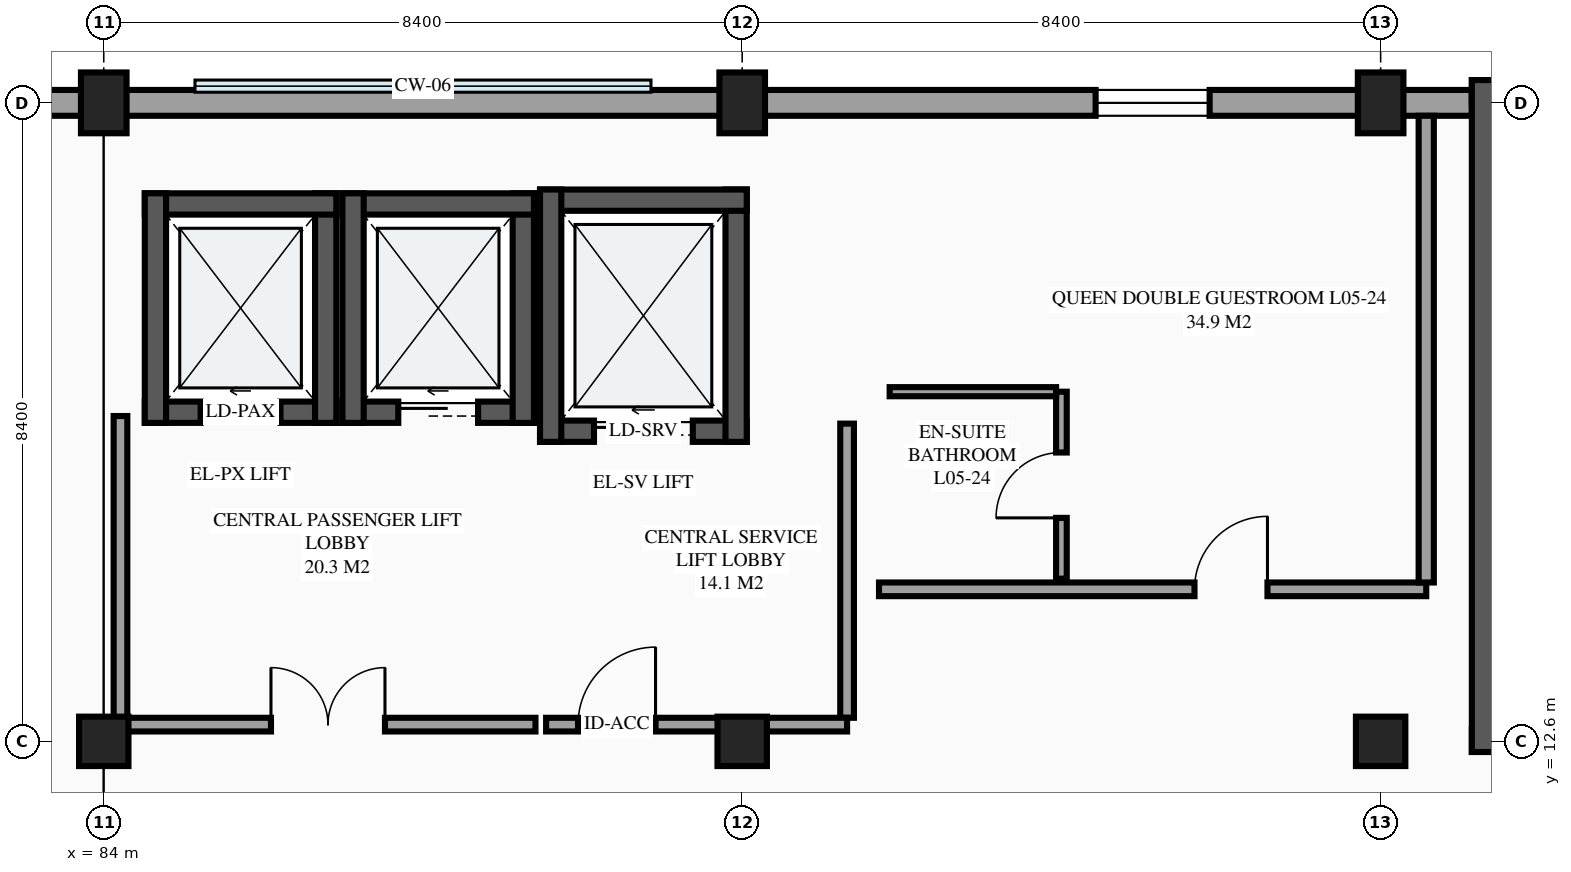
"""IFC4 building model, lengths in metres.
Left out: names, types, materials, properties, quantities, classifications, styles, units other than length and angle.
Written with IfcOpenShell. Run it as: python <this file> out.ifc"""

import sys

from ifc_helpers import new_model, si_unit, direction, frame, frame_2d, origin, origin_2d, place, context, subcontext, project, spatial, rectangle, extrude, element, fill, save


model = new_model("IFC4")
c1 = context("Model", 3, precision=1e-05, world=origin(), true_north=direction((0.0, 1.0)))
c2 = subcontext(c1, "Body", "Model", "MODEL_VIEW")
j1 = project(units=[si_unit("LENGTHUNIT", "METRE"), si_unit("PLANEANGLEUNIT", "RADIAN")], contexts=[c1])
p1 = place(None, origin())
s1 = spatial("IfcSite", under=j1, at=p1, CompositionType="ELEMENT")
p2 = place(p1, origin())
s2 = spatial("IfcBuilding", under=s1, at=p2, CompositionType="ELEMENT")
p3 = place(p2, frame((0.0, 0.0, 21.9)))
s3 = spatial("IfcBuildingStorey", under=s2, at=p3, CompositionType="ELEMENT", Elevation=21.9)
p4 = place(p3, frame((84.0, 12.6, 0.0), z_axis=(0.0, 0.0, 1.0), x_axis=(1.0, 0.0, 0.0)))
e1 = element("IfcColumn", 1, at=p4, inside=s3, PredefinedType="COLUMN", context=c2, shape_type="SweptSolid", body=[
    extrude(rectangle(XDim=0.65, YDim=0.65, at=origin_2d()), origin(), (0.0, 0.0, 1.0), 3.6),
])
p5 = place(p3, frame((84.0, 21.0, 0.0), z_axis=(0.0, 0.0, 1.0), x_axis=(1.0, 0.0, 0.0)))
e2 = element("IfcColumn", 2, at=p5, inside=s3, PredefinedType="COLUMN", context=c2, shape_type="SweptSolid", body=[
    extrude(rectangle(XDim=0.6, YDim=0.8, at=origin_2d()), origin(), (0.0, 0.0, 1.0), 3.6),
])
p6 = place(p3, frame((92.4, 12.6, 0.0), z_axis=(0.0, 0.0, 1.0), x_axis=(1.0, 0.0, 0.0)))
e3 = element("IfcColumn", 3, at=p6, inside=s3, PredefinedType="COLUMN", context=c2, shape_type="SweptSolid", body=[
    extrude(rectangle(XDim=0.65, YDim=0.65, at=origin_2d()), origin(), (0.0, 0.0, 1.0), 3.6),
])
p7 = place(p3, frame((92.4, 21.0, 0.0), z_axis=(0.0, 0.0, 1.0), x_axis=(1.0, 0.0, 0.0)))
e4 = element("IfcColumn", 4, at=p7, inside=s3, PredefinedType="COLUMN", context=c2, shape_type="SweptSolid", body=[
    extrude(rectangle(XDim=0.6, YDim=0.8, at=origin_2d()), origin(), (0.0, 0.0, 1.0), 3.6),
])
p8 = place(p3, frame((100.8, 12.6, 0.0), z_axis=(0.0, 0.0, 1.0), x_axis=(1.0, 0.0, 0.0)))
e5 = element("IfcColumn", 5, at=p8, inside=s3, PredefinedType="COLUMN", context=c2, shape_type="SweptSolid", body=[
    extrude(rectangle(XDim=0.65, YDim=0.65, at=origin_2d()), origin(), (0.0, 0.0, 1.0), 3.6),
])
p9 = place(p3, frame((100.8, 21.0, 0.0), z_axis=(0.0, 0.0, 1.0), x_axis=(1.0, 0.0, 0.0)))
e6 = element("IfcColumn", 6, at=p9, inside=s3, PredefinedType="COLUMN", context=c2, shape_type="SweptSolid", body=[
    extrude(rectangle(XDim=0.6, YDim=0.8, at=origin_2d()), origin(), (0.0, 0.0, 1.0), 3.6),
])
p10 = place(p3, frame((102.0, 21.0, 0.0), z_axis=(0.0, 0.0, 1.0), x_axis=(-1.0, 0.0, 0.0)))
e7 = element("IfcWall", 7, at=p10, inside=s3, PredefinedType="STANDARD", context=c2, shape_type="SweptSolid", body=[
    extrude(rectangle(XDim=9.6, YDim=0.34, at=frame_2d((4.8, 0.0))), origin(), (0.0, 0.0, 1.0), 2.48),
])
p11 = place(p10, frame((3.45, 0.0, 0.85)))
e8 = element("IfcOpeningElement", 8, at=p11, cuts=e7, PredefinedType="OPENING", context=c2, shape_type="SweptSolid", body=[
    extrude(rectangle(XDim=1.5, YDim=1.5, at=frame_2d((0.75, 0.75))), frame((0.0, 0.18, 0.0), z_axis=(0.0, -1.0, 0.0), x_axis=(1.0, 0.0, 0.0)), (0.0, 0.0, 1.0), 0.36),
])
p12 = place(p3, frame((84.54, 16.93, 0.0), z_axis=(0.0, 0.0, 1.0), x_axis=(1.0, 0.0, 0.0)))
e9 = element("IfcWall", 9, at=p12, inside=s3, PredefinedType="SHEAR", context=c2, shape_type="SweptSolid", body=[
    extrude(rectangle(XDim=2.52, YDim=0.28, at=frame_2d((1.26, 0.0))), origin(), (0.0, 0.0, 1.0), 3.6),
])
p13 = place(p12, frame((0.735, 0.0, 0.0)))
e10 = element("IfcOpeningElement", 10, at=p13, cuts=e9, PredefinedType="OPENING", context=c2, shape_type="SweptSolid", body=[
    extrude(rectangle(XDim=1.05, YDim=2.2, at=frame_2d((0.525, 1.1))), frame((0.0, 0.15, 0.0), z_axis=(0.0, -1.0, 0.0), x_axis=(1.0, 0.0, 0.0)), (0.0, 0.0, 1.0), 0.3),
])
p14 = place(p3, frame((86.92, 16.79, 0.0), z_axis=(0.0, 0.0, 1.0), x_axis=(0.0, 1.0, 0.0)))
e11 = element("IfcWall", 11, at=p14, inside=s3, PredefinedType="SHEAR", context=c2, shape_type="SweptSolid", body=[
    extrude(rectangle(XDim=3.02, YDim=0.28, at=frame_2d((1.51, 0.0))), origin(), (0.0, 0.0, 1.0), 3.6),
])
p15 = place(p3, frame((87.06, 19.67, 0.0), z_axis=(0.0, 0.0, 1.0), x_axis=(-1.0, 0.0, 0.0)))
e12 = element("IfcWall", 12, at=p15, inside=s3, PredefinedType="SHEAR", context=c2, shape_type="SweptSolid", body=[
    extrude(rectangle(XDim=2.52, YDim=0.28, at=frame_2d((1.26, 0.0))), origin(), (0.0, 0.0, 1.0), 3.6),
])
p16 = place(p3, frame((84.68, 19.81, 0.0), z_axis=(0.0, 0.0, 1.0), x_axis=(0.0, -1.0, 0.0)))
e13 = element("IfcWall", 13, at=p16, inside=s3, PredefinedType="SHEAR", context=c2, shape_type="SweptSolid", body=[
    extrude(rectangle(XDim=3.02, YDim=0.28, at=frame_2d((1.51, 0.0))), origin(), (0.0, 0.0, 1.0), 3.6),
])
p17 = place(p3, frame((87.14, 16.93, 0.0), z_axis=(0.0, 0.0, 1.0), x_axis=(1.0, 0.0, 0.0)))
e14 = element("IfcWall", 14, at=p17, inside=s3, PredefinedType="SHEAR", context=c2, shape_type="SweptSolid", body=[
    extrude(rectangle(XDim=2.52, YDim=0.28, at=frame_2d((1.26, 0.0))), origin(), (0.0, 0.0, 1.0), 3.6),
])
p18 = place(p17, frame((0.735, 0.0, 0.0)))
e15 = element("IfcOpeningElement", 15, at=p18, cuts=e14, PredefinedType="OPENING", context=c2, shape_type="SweptSolid", body=[
    extrude(rectangle(XDim=1.05, YDim=2.2, at=frame_2d((0.525, 1.1))), frame((0.0, 0.15, 0.0), z_axis=(0.0, -1.0, 0.0), x_axis=(1.0, 0.0, 0.0)), (0.0, 0.0, 1.0), 0.3),
])
p19 = place(p3, frame((89.52, 16.79, 0.0), z_axis=(0.0, 0.0, 1.0), x_axis=(0.0, 1.0, 0.0)))
e16 = element("IfcWall", 16, at=p19, inside=s3, PredefinedType="SHEAR", context=c2, shape_type="SweptSolid", body=[
    extrude(rectangle(XDim=3.02, YDim=0.28, at=frame_2d((1.51, 0.0))), origin(), (0.0, 0.0, 1.0), 3.6),
])
p20 = place(p3, frame((89.66, 19.67, 0.0), z_axis=(0.0, 0.0, 1.0), x_axis=(-1.0, 0.0, 0.0)))
e17 = element("IfcWall", 17, at=p20, inside=s3, PredefinedType="SHEAR", context=c2, shape_type="SweptSolid", body=[
    extrude(rectangle(XDim=2.52, YDim=0.28, at=frame_2d((1.26, 0.0))), origin(), (0.0, 0.0, 1.0), 3.6),
])
p21 = place(p3, frame((87.28, 19.81, 0.0), z_axis=(0.0, 0.0, 1.0), x_axis=(0.0, -1.0, 0.0)))
e18 = element("IfcWall", 18, at=p21, inside=s3, PredefinedType="SHEAR", context=c2, shape_type="SweptSolid", body=[
    extrude(rectangle(XDim=3.02, YDim=0.28, at=frame_2d((1.51, 0.0))), origin(), (0.0, 0.0, 1.0), 3.6),
])
p22 = place(p3, frame((89.74, 16.68, 0.0), z_axis=(0.0, 0.0, 1.0), x_axis=(1.0, 0.0, 0.0)))
e19 = element("IfcWall", 19, at=p22, inside=s3, PredefinedType="SHEAR", context=c2, shape_type="SweptSolid", body=[
    extrude(rectangle(XDim=2.72, YDim=0.28, at=frame_2d((1.36, 0.0))), origin(), (0.0, 0.0, 1.0), 3.6),
])
p23 = place(p22, frame((0.71, 0.0, 0.0)))
e20 = element("IfcOpeningElement", 20, at=p23, cuts=e19, PredefinedType="OPENING", context=c2, shape_type="SweptSolid", body=[
    extrude(rectangle(XDim=1.3, YDim=2.25, at=frame_2d((0.65, 1.125))), frame((0.0, 0.15, 0.0), z_axis=(0.0, -1.0, 0.0), x_axis=(1.0, 0.0, 0.0)), (0.0, 0.0, 1.0), 0.3),
])
p24 = place(p3, frame((92.32, 16.54, 0.0), z_axis=(0.0, 0.0, 1.0), x_axis=(0.0, 1.0, 0.0)))
e21 = element("IfcWall", 21, at=p24, inside=s3, PredefinedType="SHEAR", context=c2, shape_type="SweptSolid", body=[
    extrude(rectangle(XDim=3.32, YDim=0.28, at=frame_2d((1.66, 0.0))), origin(), (0.0, 0.0, 1.0), 3.6),
])
p25 = place(p3, frame((92.46, 19.72, 0.0), z_axis=(0.0, 0.0, 1.0), x_axis=(-1.0, 0.0, 0.0)))
e22 = element("IfcWall", 22, at=p25, inside=s3, PredefinedType="SHEAR", context=c2, shape_type="SweptSolid", body=[
    extrude(rectangle(XDim=2.72, YDim=0.28, at=frame_2d((1.36, 0.0))), origin(), (0.0, 0.0, 1.0), 3.6),
])
p26 = place(p3, frame((89.88, 19.86, 0.0), z_axis=(0.0, 0.0, 1.0), x_axis=(0.0, -1.0, 0.0)))
e23 = element("IfcWall", 23, at=p26, inside=s3, PredefinedType="SHEAR", context=c2, shape_type="SweptSolid", body=[
    extrude(rectangle(XDim=3.32, YDim=0.28, at=frame_2d((1.66, 0.0))), origin(), (0.0, 0.0, 1.0), 3.6),
])
p27 = place(p3, frame((102.0, 12.61, 0.0), z_axis=(0.0, 0.0, 1.0), x_axis=(1.0, 0.0, 0.0)))
e24 = element("IfcWall", 24, at=p27, inside=s3, PredefinedType="SHEAR", context=c2, shape_type="SweptSolid", body=[
    extrude(rectangle(XDim=5.2, YDim=0.3, at=frame_2d((2.6, 0.0))), origin(), (0.0, 0.0, 1.0), 3.6),
])
p28 = place(p27, frame((2.025, 0.0, 0.0)))
e25 = element("IfcOpeningElement", 25, at=p28, cuts=e24, PredefinedType="OPENING", context=c2, shape_type="SweptSolid", body=[
    extrude(rectangle(XDim=1.15, YDim=2.15, at=frame_2d((0.575, 1.075))), frame((0.0, 0.16, 0.0), z_axis=(0.0, -1.0, 0.0), x_axis=(1.0, 0.0, 0.0)), (0.0, 0.0, 1.0), 0.32),
])
p29 = place(p3, frame((107.2, 21.15, 0.0), z_axis=(0.0, 0.0, 1.0), x_axis=(-1.0, 0.0, 0.0)))
e26 = element("IfcWall", 26, at=p29, inside=s3, PredefinedType="SHEAR", context=c2, shape_type="SweptSolid", body=[
    extrude(rectangle(XDim=5.2, YDim=0.3, at=frame_2d((2.6, 0.0))), origin(), (0.0, 0.0, 1.0), 3.6),
])
p30 = place(p3, frame((102.15, 21.3, 0.0), z_axis=(0.0, 0.0, 1.0), x_axis=(0.0, -1.0, 0.0)))
e27 = element("IfcWall", 27, at=p30, inside=s3, PredefinedType="SHEAR", context=c2, shape_type="SweptSolid", body=[
    extrude(rectangle(XDim=8.84, YDim=0.3, at=frame_2d((4.42, 0.0))), origin(), (0.0, 0.0, 1.0), 3.6),
])
p31 = place(p3, frame((94.2, 14.6, 0.0), z_axis=(0.0, 0.0, 1.0), x_axis=(1.0, 0.0, 0.0)))
e28 = element("IfcWall", 28, at=p31, inside=s3, PredefinedType="PARTITIONING", context=c2, shape_type="SweptSolid", body=[
    extrude(rectangle(XDim=7.2, YDim=0.18, at=frame_2d((3.6, 0.0))), origin(), (0.0, 0.0, 1.0), 3.375),
])
p32 = place(p31, frame((4.151, 0.0, 0.0)))
e29 = element("IfcOpeningElement", 29, at=p32, cuts=e28, PredefinedType="OPENING", context=c2, shape_type="SweptSolid", body=[
    extrude(rectangle(XDim=0.96, YDim=2.15, at=frame_2d((0.48, 1.075))), frame((0.0, 0.1, 0.0), z_axis=(0.0, -1.0, 0.0), x_axis=(1.0, 0.0, 0.0)), (0.0, 0.0, 1.0), 0.2),
])
p33 = place(p3, frame((101.4, 14.69, 0.0), z_axis=(0.0, 0.0, 1.0), x_axis=(0.0, 1.0, 0.0)))
e30 = element("IfcWall", 30, at=p33, inside=s3, PredefinedType="PARTITIONING", context=c2, shape_type="SweptSolid", body=[
    extrude(rectangle(XDim=6.14, YDim=0.2, at=frame_2d((3.07, 0.0))), origin(), (0.0, 0.0, 1.0), 3.375),
])
p34 = place(p3, frame((96.6, 14.74, 0.0), z_axis=(0.0, 0.0, 1.0), x_axis=(0.0, 1.0, 0.0)))
e31 = element("IfcWall", 31, at=p34, inside=s3, PredefinedType="PARTITIONING", context=c2, shape_type="SweptSolid", body=[
    extrude(rectangle(XDim=2.46, YDim=0.14, at=frame_2d((1.23, 0.0))), origin(), (0.0, 0.0, 1.0), 3.375),
])
p35 = place(p34, frame((0.8, 0.0, 0.0)))
e32 = element("IfcOpeningElement", 32, at=p35, cuts=e31, PredefinedType="OPENING", context=c2, shape_type="SweptSolid", body=[
    extrude(rectangle(XDim=0.86, YDim=2.1, at=frame_2d((0.43, 1.05))), frame((0.0, 0.08, 0.0), z_axis=(0.0, -1.0, 0.0), x_axis=(1.0, 0.0, 0.0)), (0.0, 0.0, 1.0), 0.16),
])
p36 = place(p3, frame((94.34, 17.2, 0.0), z_axis=(0.0, 0.0, 1.0), x_axis=(1.0, 0.0, 0.0)))
e33 = element("IfcWall", 33, at=p36, inside=s3, PredefinedType="PARTITIONING", context=c2, shape_type="SweptSolid", body=[
    extrude(rectangle(XDim=2.19, YDim=0.12, at=frame_2d((1.095, 0.0))), origin(), (0.0, 0.0, 1.0), 3.375),
])
p37 = place(p3, frame((84.22, 12.82, 0.0), z_axis=(0.0, 0.0, 1.0), x_axis=(1.0, 0.0, 0.0)))
e34 = element("IfcWall", 34, at=p37, inside=s3, PredefinedType="PARTITIONING", context=c2, shape_type="SweptSolid", body=[
    extrude(rectangle(XDim=5.46, YDim=0.18, at=frame_2d((2.73, 0.0))), origin(), (0.0, 0.0, 1.0), 2.48),
])
p38 = place(p37, frame((1.98, 0.0, 0.0)))
e35 = element("IfcOpeningElement", 35, at=p38, cuts=e34, PredefinedType="OPENING", context=c2, shape_type="SweptSolid", body=[
    extrude(rectangle(XDim=1.5, YDim=2.15, at=frame_2d((0.75, 1.075))), frame((0.0, 0.1, 0.0), z_axis=(0.0, -1.0, 0.0), x_axis=(1.0, 0.0, 0.0)), (0.0, 0.0, 1.0), 0.2),
])
p39 = place(p3, frame((84.22, 12.91, 0.0), z_axis=(0.0, 0.0, 1.0), x_axis=(0.0, 1.0, 0.0)))
e36 = element("IfcWall", 36, at=p39, inside=s3, PredefinedType="PARTITIONING", context=c2, shape_type="SweptSolid", body=[
    extrude(rectangle(XDim=3.97, YDim=0.18, at=frame_2d((1.985, 0.0))), origin(), (0.0, 0.0, 1.0), 2.48),
])
p40 = place(p3, frame((89.82, 12.82, 0.0), z_axis=(0.0, 0.0, 1.0), x_axis=(1.0, 0.0, 0.0)))
e37 = element("IfcWall", 37, at=p40, inside=s3, PredefinedType="PARTITIONING", context=c2, shape_type="SweptSolid", body=[
    extrude(rectangle(XDim=2.58, YDim=0.18, at=frame_2d((1.29, 0.0))), origin(), (0.0, 0.0, 1.0), 2.48),
])
p41 = place(p40, frame((0.42, 0.0, 0.0)))
e38 = element("IfcOpeningElement", 38, at=p41, cuts=e37, PredefinedType="OPENING", context=c2, shape_type="SweptSolid", body=[
    extrude(rectangle(XDim=1.02, YDim=2.15, at=frame_2d((0.51, 1.075))), frame((0.0, 0.1, 0.0), z_axis=(0.0, -1.0, 0.0), x_axis=(1.0, 0.0, 0.0)), (0.0, 0.0, 1.0), 0.2),
])
p42 = place(p3, frame((93.78, 12.91, 0.0), z_axis=(0.0, 0.0, 1.0), x_axis=(0.0, 1.0, 0.0)))
e39 = element("IfcWall", 39, at=p42, inside=s3, PredefinedType="PARTITIONING", context=c2, shape_type="SweptSolid", body=[
    extrude(rectangle(XDim=3.87, YDim=0.18, at=frame_2d((1.935, 0.0))), origin(), (0.0, 0.0, 1.0), 3.375),
])
p43 = place(p3, frame((92.4, 21.0, 0.0), z_axis=(0.0, 0.0, 1.0), x_axis=(-1.0, 0.0, 0.0)))
e40 = element("IfcWall", 40, at=p43, inside=s3, PredefinedType="STANDARD", context=c2, shape_type="SweptSolid", body=[
    extrude(rectangle(XDim=8.4, YDim=0.34, at=frame_2d((4.2, 0.0))), origin(), (0.0, 0.0, 1.0), 2.88),
])
p44 = place(p3, frame((84.0, 21.0, 0.0), z_axis=(0.0, 0.0, 1.0), x_axis=(-1.0, 0.0, 0.0)))
e41 = element("IfcWall", 41, at=p44, inside=s3, PredefinedType="STANDARD", context=c2, shape_type="SweptSolid", body=[
    extrude(rectangle(XDim=2.0, YDim=0.34, at=frame_2d((1.0, 0.0))), origin(), (0.0, 0.0, 1.0), 2.78),
])
p45 = place(p3, frame((92.4, 12.82, 0.0), z_axis=(0.0, 0.0, 1.0), x_axis=(1.0, 0.0, 0.0)))
e42 = element("IfcWall", 42, at=p45, inside=s3, PredefinedType="PARTITIONING", context=c2, shape_type="SweptSolid", body=[
    extrude(rectangle(XDim=1.38, YDim=0.18, at=frame_2d((0.69, 0.0))), origin(), (0.0, 0.0, 1.0), 2.58),
])
p46 = place(p11, origin())
e43 = element("IfcWindow", 43, at=p46, inside=s3, PartitioningType="SINGLE_PANEL", PredefinedType="WINDOW", context=c2, shape_type="SweptSolid", body=[
    extrude(rectangle(XDim=1.5, YDim=1.5, at=frame_2d((0.75, 0.75))), frame((0.0, 0.03, 0.0), z_axis=(0.0, -1.0, 0.0), x_axis=(1.0, 0.0, 0.0)), (0.0, 0.0, 1.0), 0.06),
])
fill(e8, e43)
p47 = place(p13, origin())
e44 = element("IfcDoor", 44, at=p47, inside=s3, OperationType="SLIDING_TO_LEFT", PredefinedType="DOOR", context=c2, shape_type="SweptSolid", body=[
    extrude(rectangle(XDim=1.05, YDim=2.2, at=frame_2d((0.525, 1.1))), frame((0.0, 0.025, 0.0), z_axis=(0.0, -1.0, 0.0), x_axis=(1.0, 0.0, 0.0)), (0.0, 0.0, 1.0), 0.05),
])
fill(e10, e44)
p48 = place(p18, origin())
e45 = element("IfcDoor", 45, at=p48, inside=s3, OperationType="SLIDING_TO_LEFT", PredefinedType="DOOR", context=c2, shape_type="SweptSolid", body=[
    extrude(rectangle(XDim=1.05, YDim=2.2, at=frame_2d((0.525, 1.1))), frame((0.0, 0.025, 0.0), z_axis=(0.0, -1.0, 0.0), x_axis=(1.0, 0.0, 0.0)), (0.0, 0.0, 1.0), 0.05),
])
fill(e15, e45)
p49 = place(p23, origin())
e46 = element("IfcDoor", 46, at=p49, inside=s3, OperationType="SLIDING_TO_LEFT", PredefinedType="DOOR", context=c2, shape_type="SweptSolid", body=[
    extrude(rectangle(XDim=1.3, YDim=2.25, at=frame_2d((0.65, 1.125))), frame((0.0, 0.025, 0.0), z_axis=(0.0, -1.0, 0.0), x_axis=(1.0, 0.0, 0.0)), (0.0, 0.0, 1.0), 0.05),
])
fill(e20, e46)
p50 = place(p32, origin())
e47 = element("IfcDoor", 47, at=p50, inside=s3, OperationType="SINGLE_SWING_RIGHT", PredefinedType="DOOR", context=c2, shape_type="SweptSolid", body=[
    extrude(rectangle(XDim=0.96, YDim=2.15, at=frame_2d((0.48, 1.075))), frame((0.0, 0.025, 0.0), z_axis=(0.0, -1.0, 0.0), x_axis=(1.0, 0.0, 0.0)), (0.0, 0.0, 1.0), 0.05),
])
fill(e29, e47)
p51 = place(p35, origin())
e48 = element("IfcDoor", 48, at=p51, inside=s3, OperationType="SINGLE_SWING_LEFT", PredefinedType="DOOR", context=c2, shape_type="SweptSolid", body=[
    extrude(rectangle(XDim=0.86, YDim=2.1, at=frame_2d((0.43, 1.05))), frame((0.0, 0.025, 0.0), z_axis=(0.0, -1.0, 0.0), x_axis=(1.0, 0.0, 0.0)), (0.0, 0.0, 1.0), 0.05),
])
fill(e32, e48)
p52 = place(p38, origin())
e49 = element("IfcDoor", 49, at=p52, inside=s3, OperationType="DOUBLE_DOOR_SINGLE_SWING", PredefinedType="DOOR", context=c2, shape_type="SweptSolid", body=[
    extrude(rectangle(XDim=1.5, YDim=2.15, at=frame_2d((0.75, 1.075))), frame((0.0, 0.025, 0.0), z_axis=(0.0, -1.0, 0.0), x_axis=(1.0, 0.0, 0.0)), (0.0, 0.0, 1.0), 0.05),
])
fill(e35, e49)
p53 = place(p41, origin())
e50 = element("IfcDoor", 50, at=p53, inside=s3, OperationType="SINGLE_SWING_RIGHT", PredefinedType="DOOR", context=c2, shape_type="SweptSolid", body=[
    extrude(rectangle(XDim=1.02, YDim=2.15, at=frame_2d((0.51, 1.075))), frame((0.0, 0.025, 0.0), z_axis=(0.0, -1.0, 0.0), x_axis=(1.0, 0.0, 0.0)), (0.0, 0.0, 1.0), 0.05),
])
fill(e38, e50)
save(model, sys.argv[1])
